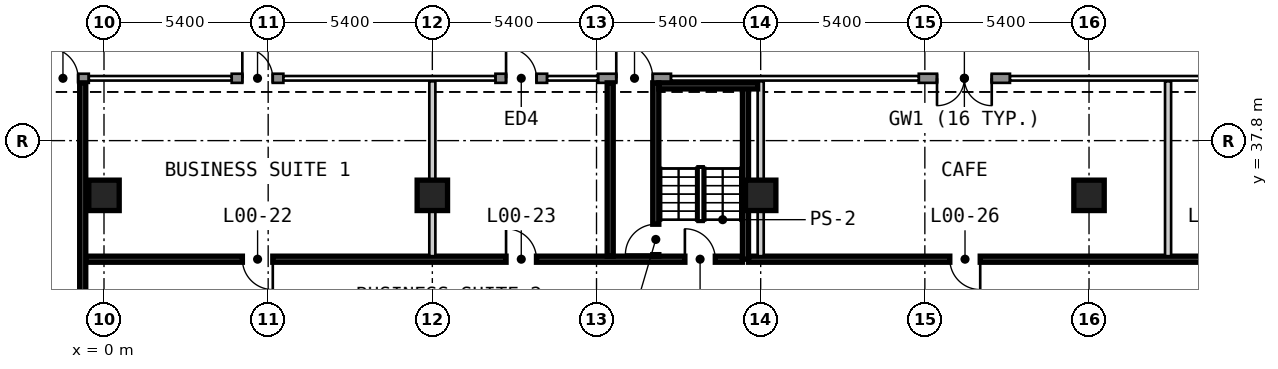
"""IFC4 building model, lengths in metres.
Left out: names, types, materials, properties, quantities, classifications, styles, units other than length and angle.
Written with IfcOpenShell. Run it as: python <this file> out.ifc"""

import sys

from ifc_helpers import new_model, si_unit, direction, frame, frame_2d, origin, origin_2d, place, context, subcontext, project, spatial, rectangle, extrude, element, fill, save


model = new_model("IFC4")
c1 = context("Model", 3, precision=1e-05, world=origin(), true_north=direction((0.0, 1.0)))
c2 = subcontext(c1, "Body", "Model", "MODEL_VIEW")
j1 = project(units=[si_unit("LENGTHUNIT", "METRE"), si_unit("PLANEANGLEUNIT", "RADIAN")], contexts=[c1])
p1 = place(None, origin())
s1 = spatial("IfcSite", under=j1, at=p1, CompositionType="ELEMENT")
p2 = place(p1, origin())
s2 = spatial("IfcBuilding", under=s1, at=p2, CompositionType="ELEMENT")
p3 = place(p2, origin())
s3 = spatial("IfcBuildingStorey", under=s2, at=p3, CompositionType="ELEMENT", Elevation=0.0)
for number, where, z_axis, x_axis in (
    (1, (0.0, 36.0, 0.0), (0.0, 0.0, 1.0), (1.0, 0.0, 0.0)),
    (2, (10.8, 36.0, 0.0), (0.0, 0.0, 1.0), (1.0, 0.0, 0.0)),
    (3, (21.6, 36.0, 0.0), (0.0, 0.0, 1.0), (1.0, 0.0, 0.0)),
    (4, (32.4, 36.0, 0.0), (0.0, 0.0, 1.0), (1.0, 0.0, 0.0)),
):
    element("IfcColumn", number, at=place(p3, frame(where, z_axis=z_axis, x_axis=x_axis)), inside=s3, PredefinedType="COLUMN", context=c2, shape_type="SweptSolid", body=[
        extrude(rectangle(XDim=1.0, YDim=1.0, at=origin_2d()), origin(), (0.0, 0.0, 1.0), 5.0),
    ])
p4 = place(p3, frame((29.8, 39.85, 0.0), z_axis=(0.0, 0.0, 1.0), x_axis=(-1.0, 0.0, 0.0)))
e5 = element("IfcWall", 5, at=p4, inside=s3, PredefinedType="SOLIDWALL", context=c2, shape_type="SweptSolid", body=[
    extrude(rectangle(XDim=3.0, YDim=0.3, at=frame_2d((1.5, 0.0))), origin(), (0.0, 0.0, 1.0), 4.55),
])
p5 = place(p4, frame((2.4, 0.0, 0.0), z_axis=(0.0, 0.0, 1.0), x_axis=(-1.0, 0.0, 0.0)))
e6 = element("IfcOpeningElement", 6, at=p5, cuts=e5, PredefinedType="OPENING", context=c2, shape_type="SweptSolid", body=[
    extrude(rectangle(XDim=1.8, YDim=2.4, at=frame_2d((0.9, 1.2))), frame((0.0, 0.16, 0.0), z_axis=(0.0, -1.0, 0.0), x_axis=(1.0, 0.0, 0.0)), (0.0, 0.0, 1.0), 0.32),
])
p6 = place(p3, frame((18.65, 39.85, 0.0), z_axis=(0.0, 0.0, 1.0), x_axis=(-1.0, 0.0, 0.0)))
e7 = element("IfcWall", 7, at=p6, inside=s3, PredefinedType="SOLIDWALL", context=c2, shape_type="SweptSolid", body=[
    extrude(rectangle(XDim=2.4, YDim=0.3, at=frame_2d((1.2, 0.0))), origin(), (0.0, 0.0, 1.0), 4.55),
])
p7 = place(p6, frame((1.8, 0.0, 0.0), z_axis=(0.0, 0.0, 1.0), x_axis=(-1.0, 0.0, 0.0)))
e8 = element("IfcOpeningElement", 8, at=p7, cuts=e7, PredefinedType="OPENING", context=c2, shape_type="SweptSolid", body=[
    extrude(rectangle(XDim=1.2, YDim=2.4, at=frame_2d((0.6, 1.2))), frame((0.0, 0.16, 0.0), z_axis=(0.0, -1.0, 0.0), x_axis=(1.0, 0.0, 0.0)), (0.0, 0.0, 1.0), 0.32),
])
p8 = place(p3, frame((14.575, 39.85, 0.0), z_axis=(0.0, 0.0, 1.0), x_axis=(-1.0, 0.0, 0.0)))
e9 = element("IfcWall", 9, at=p8, inside=s3, PredefinedType="SOLIDWALL", context=c2, shape_type="SweptSolid", body=[
    extrude(rectangle(XDim=1.7, YDim=0.3, at=frame_2d((0.85, 0.0))), origin(), (0.0, 0.0, 1.0), 4.55),
])
p9 = place(p8, frame((1.35, 0.0, 0.0), z_axis=(0.0, 0.0, 1.0), x_axis=(-1.0, 0.0, 0.0)))
e10 = element("IfcOpeningElement", 10, at=p9, cuts=e9, PredefinedType="OPENING", context=c2, shape_type="SweptSolid", body=[
    extrude(rectangle(XDim=1.0, YDim=2.4, at=frame_2d((0.5, 1.2))), frame((0.0, 0.16, 0.0), z_axis=(0.0, -1.0, 0.0), x_axis=(1.0, 0.0, 0.0)), (0.0, 0.0, 1.0), 0.32),
])
p10 = place(p3, frame((5.9, 39.85, 0.0), z_axis=(0.0, 0.0, 1.0), x_axis=(-1.0, 0.0, 0.0)))
e11 = element("IfcWall", 11, at=p10, inside=s3, PredefinedType="SOLIDWALL", context=c2, shape_type="SweptSolid", body=[
    extrude(rectangle(XDim=1.7, YDim=0.3, at=frame_2d((0.85, 0.0))), origin(), (0.0, 0.0, 1.0), 4.55),
])
p11 = place(p10, frame((1.35, 0.0, 0.0), z_axis=(0.0, 0.0, 1.0), x_axis=(-1.0, 0.0, 0.0)))
e12 = element("IfcOpeningElement", 12, at=p11, cuts=e11, PredefinedType="OPENING", context=c2, shape_type="SweptSolid", body=[
    extrude(rectangle(XDim=1.0, YDim=2.4, at=frame_2d((0.5, 1.2))), frame((0.0, 0.16, 0.0), z_axis=(0.0, -1.0, 0.0), x_axis=(1.0, 0.0, 0.0)), (0.0, 0.0, 1.0), 0.32),
])
p12 = place(p3, frame((-0.5, 39.85, 0.0), z_axis=(0.0, 0.0, 1.0), x_axis=(-1.0, 0.0, 0.0)))
e13 = element("IfcWall", 13, at=p12, inside=s3, PredefinedType="SOLIDWALL", context=c2, shape_type="SweptSolid", body=[
    extrude(rectangle(XDim=1.7, YDim=0.3, at=frame_2d((0.85, 0.0))), origin(), (0.0, 0.0, 1.0), 4.55),
])
p13 = place(p12, frame((1.35, 0.0, 0.0), z_axis=(0.0, 0.0, 1.0), x_axis=(-1.0, 0.0, 0.0)))
e14 = element("IfcOpeningElement", 14, at=p13, cuts=e13, PredefinedType="OPENING", context=c2, shape_type="SweptSolid", body=[
    extrude(rectangle(XDim=1.0, YDim=2.4, at=frame_2d((0.5, 1.2))), frame((0.0, 0.16, 0.0), z_axis=(0.0, -1.0, 0.0), x_axis=(1.0, 0.0, 0.0)), (0.0, 0.0, 1.0), 0.32),
])
p14 = place(p3, frame((-0.6, 33.9, 0.0), z_axis=(0.0, 0.0, 1.0), x_axis=(1.0, 0.0, 0.0)))
e15 = element("IfcWall", 15, at=p14, inside=s3, PredefinedType="SOLIDWALL", context=c2, shape_type="SweptSolid", body=[
    extrude(rectangle(XDim=21.6, YDim=0.2, at=frame_2d((10.8, 0.0))), origin(), (0.0, 0.0, 1.0), 4.55),
])
p15 = place(p14, frame((5.152, 0.0, 0.0)))
e16 = element("IfcOpeningElement", 16, at=p15, cuts=e15, PredefinedType="OPENING", context=c2, shape_type="SweptSolid", body=[
    extrude(rectangle(XDim=1.0, YDim=2.1, at=frame_2d((0.5, 1.05))), frame((0.0, 0.11, 0.0), z_axis=(0.0, -1.0, 0.0), x_axis=(1.0, 0.0, 0.0)), (0.0, 0.0, 1.0), 0.22),
])
p16 = place(p14, frame((13.825, 0.0, 0.0)))
e17 = element("IfcOpeningElement", 17, at=p16, cuts=e15, PredefinedType="OPENING", context=c2, shape_type="SweptSolid", body=[
    extrude(rectangle(XDim=1.0, YDim=2.1, at=frame_2d((0.5, 1.05))), frame((0.0, 0.11, 0.0), z_axis=(0.0, -1.0, 0.0), x_axis=(1.0, 0.0, 0.0)), (0.0, 0.0, 1.0), 0.22),
])
p17 = place(p14, frame((19.707, 0.0, 0.0)))
e18 = element("IfcOpeningElement", 18, at=p17, cuts=e15, PredefinedType="OPENING", context=c2, shape_type="SweptSolid", body=[
    extrude(rectangle(XDim=1.0, YDim=2.1, at=frame_2d((0.5, 1.05))), frame((0.0, 0.11, 0.0), z_axis=(0.0, -1.0, 0.0), x_axis=(1.0, 0.0, 0.0)), (0.0, 0.0, 1.0), 0.22),
])
p18 = place(p3, frame((21.2, 33.9, 0.0), z_axis=(0.0, 0.0, 1.0), x_axis=(1.0, 0.0, 0.0)))
e19 = element("IfcWall", 19, at=p18, inside=s3, PredefinedType="SOLIDWALL", context=c2, shape_type="SweptSolid", body=[
    extrude(rectangle(XDim=26.5, YDim=0.2, at=frame_2d((13.25, 0.0))), origin(), (0.0, 0.0, 1.0), 4.55),
])
p19 = place(p18, frame((15.098, 0.0, 0.0)))
e20 = element("IfcOpeningElement", 20, at=p19, cuts=e19, PredefinedType="OPENING", context=c2, shape_type="SweptSolid", body=[
    extrude(rectangle(XDim=1.0, YDim=2.1, at=frame_2d((0.5, 1.05))), frame((0.0, 0.11, 0.0), z_axis=(0.0, -1.0, 0.0), x_axis=(1.0, 0.0, 0.0)), (0.0, 0.0, 1.0), 0.22),
])
p20 = place(p18, frame((6.621, 0.0, 0.0)))
e21 = element("IfcOpeningElement", 21, at=p20, cuts=e19, PredefinedType="OPENING", context=c2, shape_type="SweptSolid", body=[
    extrude(rectangle(XDim=1.0, YDim=2.1, at=frame_2d((0.5, 1.05))), frame((0.0, 0.11, 0.0), z_axis=(0.0, -1.0, 0.0), x_axis=(1.0, 0.0, 0.0)), (0.0, 0.0, 1.0), 0.22),
])
p21 = place(p18, frame((24.425, 0.0, 0.0)))
e22 = element("IfcOpeningElement", 22, at=p21, cuts=e19, PredefinedType="OPENING", context=c2, shape_type="SweptSolid", body=[
    extrude(rectangle(XDim=1.0, YDim=2.1, at=frame_2d((0.5, 1.05))), frame((0.0, 0.11, 0.0), z_axis=(0.0, -1.0, 0.0), x_axis=(1.0, 0.0, 0.0)), (0.0, 0.0, 1.0), 0.22),
])
p22 = place(p3, frame((-0.7, 27.4, 0.0), z_axis=(0.0, 0.0, 1.0), x_axis=(0.0, 1.0, 0.0)))
e23 = element("IfcWall", 23, at=p22, inside=s3, PredefinedType="SOLIDWALL", context=c2, shape_type="SweptSolid", body=[
    extrude(rectangle(XDim=12.3, YDim=0.2, at=frame_2d((6.15, 0.0))), origin(), (0.0, 0.0, 1.0), 4.55),
])
p23 = place(p3, frame((10.8, 34.0, 0.0), z_axis=(0.0, 0.0, 1.0), x_axis=(0.0, 1.0, 0.0)))
e24 = element("IfcWall", 24, at=p23, inside=s3, PredefinedType="PARTITIONING", context=c2, shape_type="SweptSolid", body=[
    extrude(rectangle(XDim=5.75, YDim=0.2, at=frame_2d((2.875, 0.0))), origin(), (0.0, 0.0, 1.0), 4.55),
])
p24 = place(p3, frame((16.65, 34.0, 0.0), z_axis=(0.0, 0.0, 1.0), x_axis=(0.0, 1.0, 0.0)))
e25 = element("IfcWall", 25, at=p24, inside=s3, PredefinedType="SOLIDWALL", context=c2, shape_type="SweptSolid", body=[
    extrude(rectangle(XDim=5.7, YDim=0.2, at=frame_2d((2.85, 0.0))), origin(), (0.0, 0.0, 1.0), 4.55),
])
p25 = place(p3, frame((18.15, 34.0, 0.0), z_axis=(0.0, 0.0, 1.0), x_axis=(0.0, 1.0, 0.0)))
e26 = element("IfcWall", 26, at=p25, inside=s3, PredefinedType="SOLIDWALL", context=c2, shape_type="SweptSolid", body=[
    extrude(rectangle(XDim=5.7, YDim=0.2, at=frame_2d((2.85, 0.0))), origin(), (0.0, 0.0, 1.0), 4.55),
])
p26 = place(p25, frame((0.05, 0.0, 0.0)))
e27 = element("IfcOpeningElement", 27, at=p26, cuts=e26, PredefinedType="OPENING", context=c2, shape_type="SweptSolid", body=[
    extrude(rectangle(XDim=1.0, YDim=2.1, at=frame_2d((0.5, 1.05))), frame((0.0, 0.11, 0.0), z_axis=(0.0, -1.0, 0.0), x_axis=(1.0, 0.0, 0.0)), (0.0, 0.0, 1.0), 0.22),
])
p27 = place(p3, frame((21.1, 33.9, 0.0), z_axis=(0.0, 0.0, 1.0), x_axis=(0.0, 1.0, 0.0)))
e28 = element("IfcWall", 28, at=p27, inside=s3, PredefinedType="SOLIDWALL", context=c2, shape_type="SweptSolid", body=[
    extrude(rectangle(XDim=5.8, YDim=0.2, at=frame_2d((2.9, 0.0))), origin(), (0.0, 0.0, 1.0), 4.55),
])
for number, where, z_axis, x_axis in (
    (29, (21.6, 34.0, 0.0), (0.0, 0.0, 1.0), (0.0, 1.0, 0.0)),
    (30, (35.0, 34.0, 0.0), (0.0, 0.0, 1.0), (0.0, 1.0, 0.0)),
):
    element("IfcWall", number, at=place(p3, frame(where, z_axis=z_axis, x_axis=x_axis)), inside=s3, PredefinedType="PARTITIONING", context=c2, shape_type="SweptSolid", body=[
        extrude(rectangle(XDim=5.75, YDim=0.2, at=frame_2d((2.875, 0.0))), origin(), (0.0, 0.0, 1.0), 4.55),
    ])
p28 = place(p3, frame((18.25, 39.6, 0.0), z_axis=(0.0, 0.0, 1.0), x_axis=(1.0, 0.0, 0.0)))
e31 = element("IfcWall", 31, at=p28, inside=s3, PredefinedType="SOLIDWALL", context=c2, shape_type="SweptSolid", body=[
    extrude(rectangle(XDim=3.25, YDim=0.2, at=frame_2d((1.625, 0.0))), origin(), (0.0, 0.0, 1.0), 4.55),
])
p29 = place(p5, origin())
e32 = element("IfcDoor", 32, at=p29, inside=s3, OperationType="DOUBLE_DOOR_DOUBLE_SWING", PredefinedType="DOOR", context=c2, shape_type="SweptSolid", body=[
    extrude(rectangle(XDim=1.8, YDim=2.4, at=frame_2d((0.9, 1.2))), frame((0.0, 0.025, 0.0), z_axis=(0.0, -1.0, 0.0), x_axis=(1.0, 0.0, 0.0)), (0.0, 0.0, 1.0), 0.05),
])
fill(e6, e32)
p30 = place(p7, origin())
e33 = element("IfcDoor", 33, at=p30, inside=s3, OperationType="SINGLE_SWING_RIGHT", PredefinedType="DOOR", context=c2, shape_type="SweptSolid", body=[
    extrude(rectangle(XDim=1.2, YDim=2.4, at=frame_2d((0.6, 1.2))), frame((0.0, 0.025, 0.0), z_axis=(0.0, -1.0, 0.0), x_axis=(1.0, 0.0, 0.0)), (0.0, 0.0, 1.0), 0.05),
])
fill(e8, e33)
p31 = place(p9, origin())
e34 = element("IfcDoor", 34, at=p31, inside=s3, OperationType="SINGLE_SWING_RIGHT", PredefinedType="DOOR", context=c2, shape_type="SweptSolid", body=[
    extrude(rectangle(XDim=1.0, YDim=2.4, at=frame_2d((0.5, 1.2))), frame((0.0, 0.025, 0.0), z_axis=(0.0, -1.0, 0.0), x_axis=(1.0, 0.0, 0.0)), (0.0, 0.0, 1.0), 0.05),
])
fill(e10, e34)
p32 = place(p11, origin())
e35 = element("IfcDoor", 35, at=p32, inside=s3, OperationType="SINGLE_SWING_RIGHT", PredefinedType="DOOR", context=c2, shape_type="SweptSolid", body=[
    extrude(rectangle(XDim=1.0, YDim=2.4, at=frame_2d((0.5, 1.2))), frame((0.0, 0.025, 0.0), z_axis=(0.0, -1.0, 0.0), x_axis=(1.0, 0.0, 0.0)), (0.0, 0.0, 1.0), 0.05),
])
fill(e12, e35)
p33 = place(p13, origin())
e36 = element("IfcDoor", 36, at=p33, inside=s3, OperationType="SINGLE_SWING_RIGHT", PredefinedType="DOOR", context=c2, shape_type="SweptSolid", body=[
    extrude(rectangle(XDim=1.0, YDim=2.4, at=frame_2d((0.5, 1.2))), frame((0.0, 0.025, 0.0), z_axis=(0.0, -1.0, 0.0), x_axis=(1.0, 0.0, 0.0)), (0.0, 0.0, 1.0), 0.05),
])
fill(e14, e36)
p34 = place(p15, origin())
e37 = element("IfcDoor", 37, at=p34, inside=s3, OperationType="SINGLE_SWING_RIGHT", PredefinedType="DOOR", context=c2, shape_type="SweptSolid", body=[
    extrude(rectangle(XDim=1.0, YDim=2.1, at=frame_2d((0.5, 1.05))), frame((0.0, 0.025, 0.0), z_axis=(0.0, -1.0, 0.0), x_axis=(1.0, 0.0, 0.0)), (0.0, 0.0, 1.0), 0.05),
])
fill(e16, e37)
p35 = place(p16, origin())
e38 = element("IfcDoor", 38, at=p35, inside=s3, OperationType="SINGLE_SWING_LEFT", PredefinedType="DOOR", context=c2, shape_type="SweptSolid", body=[
    extrude(rectangle(XDim=1.0, YDim=2.1, at=frame_2d((0.5, 1.05))), frame((0.0, 0.025, 0.0), z_axis=(0.0, -1.0, 0.0), x_axis=(1.0, 0.0, 0.0)), (0.0, 0.0, 1.0), 0.05),
])
fill(e17, e38)
p36 = place(p20, origin())
e39 = element("IfcDoor", 39, at=p36, inside=s3, OperationType="SINGLE_SWING_RIGHT", PredefinedType="DOOR", context=c2, shape_type="SweptSolid", body=[
    extrude(rectangle(XDim=1.0, YDim=2.1, at=frame_2d((0.5, 1.05))), frame((0.0, 0.025, 0.0), z_axis=(0.0, -1.0, 0.0), x_axis=(1.0, 0.0, 0.0)), (0.0, 0.0, 1.0), 0.05),
])
fill(e21, e39)
p37 = place(p17, origin())
e40 = element("IfcDoor", 40, at=p37, inside=s3, OperationType="SINGLE_SWING_LEFT", PredefinedType="DOOR", context=c2, shape_type="SweptSolid", body=[
    extrude(rectangle(XDim=1.0, YDim=2.1, at=frame_2d((0.5, 1.05))), frame((0.0, 0.025, 0.0), z_axis=(0.0, -1.0, 0.0), x_axis=(1.0, 0.0, 0.0)), (0.0, 0.0, 1.0), 0.05),
])
fill(e18, e40)
p38 = place(p26, origin())
e41 = element("IfcDoor", 41, at=p38, inside=s3, OperationType="SINGLE_SWING_LEFT", PredefinedType="DOOR", context=c2, shape_type="SweptSolid", body=[
    extrude(rectangle(XDim=1.0, YDim=2.1, at=frame_2d((0.5, 1.05))), frame((0.0, 0.025, 0.0), z_axis=(0.0, -1.0, 0.0), x_axis=(1.0, 0.0, 0.0)), (0.0, 0.0, 1.0), 0.05),
])
fill(e27, e41)
save(model, sys.argv[1])
